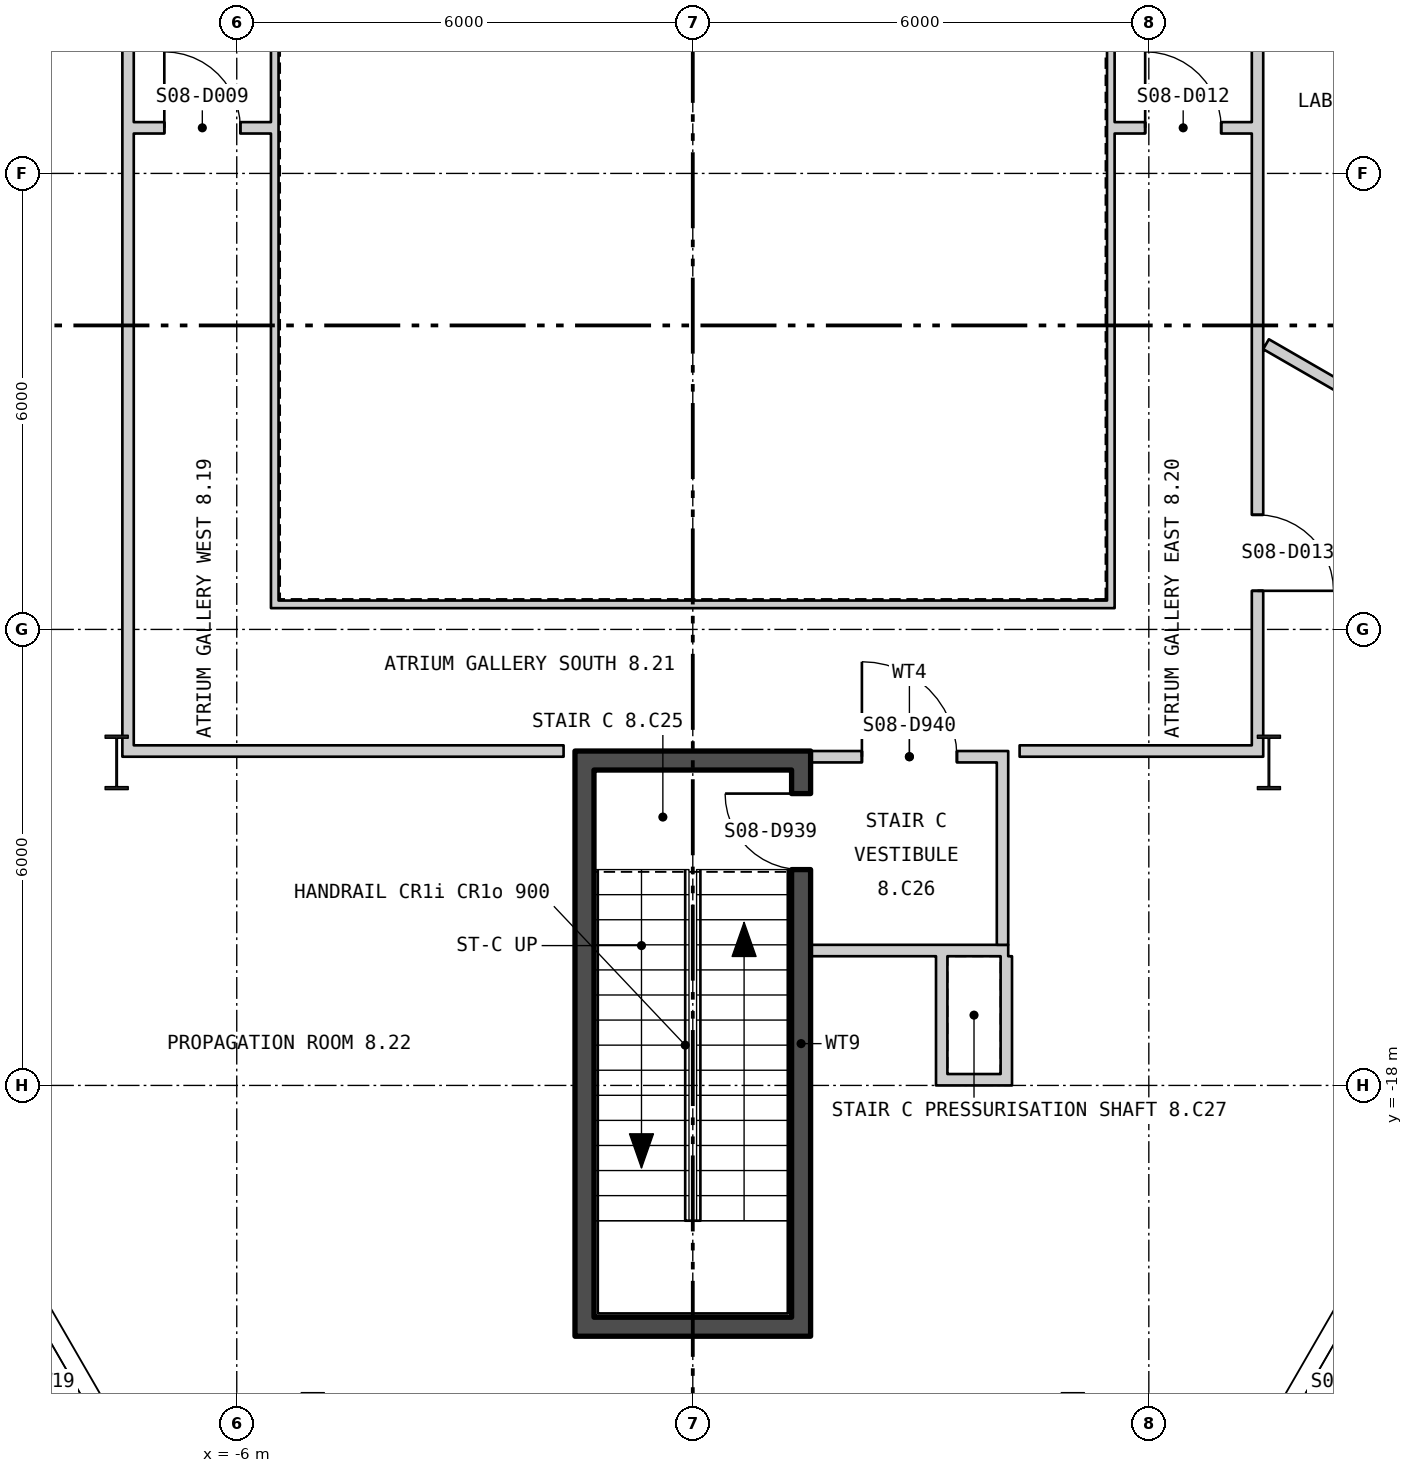
"""IFC4 building model, lengths in metres.
Left out: names, types, materials, properties, quantities, classifications, styles, units other than length and angle.
Written with IfcOpenShell. Run it as: python <this file> out.ifc"""

import sys

from ifc_helpers import new_model, si_unit, direction, frame, frame_2d, origin, origin_2d, place, context, subcontext, project, spatial, polyline, rectangle, i_section, outline, extrude, element, fill, save


model = new_model("IFC4")
c1 = context("Model", 3, precision=1e-05, world=origin(), true_north=direction((0.0, 1.0)))
c2 = subcontext(c1, "Body", "Model", "MODEL_VIEW")
j1 = project(units=[si_unit("LENGTHUNIT", "METRE"), si_unit("PLANEANGLEUNIT", "RADIAN")], contexts=[c1])
p1 = place(None, origin())
s1 = spatial("IfcSite", under=j1, at=p1, CompositionType="ELEMENT")
p2 = place(p1, origin())
s2 = spatial("IfcBuilding", under=s1, at=p2, CompositionType="ELEMENT")
p3 = place(p2, frame((0.0, 0.0, 111.3)))
s3 = spatial("IfcBuildingStorey", under=s2, at=p3, CompositionType="ELEMENT", Elevation=111.3)
for number, where, z_axis, x_axis in (
    (1, (7.58, -13.75, 0.0), (0.0, 0.0, 1.0), (1.0, 0.0, 0.0)),
    (2, (-7.58, -13.75, 0.0), (0.0, 0.0, 1.0), (1.0, 0.0, 0.0)),
    (3, (5.0, -22.4, 0.0), (0.0, 0.0, 1.0), (1.0, 0.0, 0.0)),
    (4, (-5.0, -22.4, 0.0), (0.0, 0.0, 1.0), (1.0, 0.0, 0.0)),
):
    element("IfcColumn", number, at=place(p3, frame(where, z_axis=z_axis, x_axis=x_axis)), inside=s3, PredefinedType="COLUMN", context=c2, shape_type="SweptSolid", body=[
        extrude(i_section(OverallWidth=0.304, OverallDepth=0.716, WebThickness=0.021, FlangeThickness=0.04, at=origin_2d()), origin(), (0.0, 0.0, 1.0), 4.5),
    ])
p4 = place(p3, frame((-27.595, 11.782, -0.18), z_axis=(0.0, 0.0, 1.0), x_axis=(0.500000141277, -0.866025322218, 0.0)))
e5 = element("IfcWall", 5, at=p4, inside=s3, PredefinedType="SOLIDWALL", context=c2, shape_type="SweptSolid", body=[
    extrude(outline(polyline([(-0.13, -0.225), (45.86, -0.225), (45.6, 0.225), (0.13, 0.225), (-0.13, -0.225)])), origin(), (0.0, 0.0, 1.0), 4.28),
])
p5 = place(p4, frame((1.424, 0.0, 1.08)))
e6 = element("IfcOpeningElement", 6, at=p5, cuts=e5, PredefinedType="OPENING", context=c2, shape_type="SweptSolid", body=[
    extrude(rectangle(XDim=2.4, YDim=2.6, at=frame_2d((1.2, 1.3))), frame((0.0, 0.235, 0.0), z_axis=(0.0, -1.0, 0.0), x_axis=(1.0, 0.0, 0.0)), (0.0, 0.0, 1.0), 0.47),
])
p6 = place(p4, frame((5.892, 0.0, 1.08)))
e7 = element("IfcOpeningElement", 7, at=p6, cuts=e5, PredefinedType="OPENING", context=c2, shape_type="SweptSolid", body=[
    extrude(rectangle(XDim=2.4, YDim=2.6, at=frame_2d((1.2, 1.3))), frame((0.0, 0.235, 0.0), z_axis=(0.0, -1.0, 0.0), x_axis=(1.0, 0.0, 0.0)), (0.0, 0.0, 1.0), 0.47),
])
p7 = place(p4, frame((10.399, 0.0, 1.08)))
e8 = element("IfcOpeningElement", 8, at=p7, cuts=e5, PredefinedType="OPENING", context=c2, shape_type="SweptSolid", body=[
    extrude(rectangle(XDim=2.4, YDim=2.6, at=frame_2d((1.2, 1.3))), frame((0.0, 0.235, 0.0), z_axis=(0.0, -1.0, 0.0), x_axis=(1.0, 0.0, 0.0)), (0.0, 0.0, 1.0), 0.47),
])
p8 = place(p4, frame((14.905, 0.0, 1.08)))
e9 = element("IfcOpeningElement", 9, at=p8, cuts=e5, PredefinedType="OPENING", context=c2, shape_type="SweptSolid", body=[
    extrude(rectangle(XDim=2.4, YDim=2.6, at=frame_2d((1.2, 1.3))), frame((0.0, 0.235, 0.0), z_axis=(0.0, -1.0, 0.0), x_axis=(1.0, 0.0, 0.0)), (0.0, 0.0, 1.0), 0.47),
])
p9 = place(p4, frame((19.412, 0.0, 1.08)))
e10 = element("IfcOpeningElement", 10, at=p9, cuts=e5, PredefinedType="OPENING", context=c2, shape_type="SweptSolid", body=[
    extrude(rectangle(XDim=2.4, YDim=2.6, at=frame_2d((1.2, 1.3))), frame((0.0, 0.235, 0.0), z_axis=(0.0, -1.0, 0.0), x_axis=(1.0, 0.0, 0.0)), (0.0, 0.0, 1.0), 0.47),
])
p10 = place(p4, frame((23.918, 0.0, 1.08)))
e11 = element("IfcOpeningElement", 11, at=p10, cuts=e5, PredefinedType="OPENING", context=c2, shape_type="SweptSolid", body=[
    extrude(rectangle(XDim=2.4, YDim=2.6, at=frame_2d((1.2, 1.3))), frame((0.0, 0.235, 0.0), z_axis=(0.0, -1.0, 0.0), x_axis=(1.0, 0.0, 0.0)), (0.0, 0.0, 1.0), 0.47),
])
p11 = place(p4, frame((28.425, 0.0, 1.08)))
e12 = element("IfcOpeningElement", 12, at=p11, cuts=e5, PredefinedType="OPENING", context=c2, shape_type="SweptSolid", body=[
    extrude(rectangle(XDim=2.4, YDim=2.6, at=frame_2d((1.2, 1.3))), frame((0.0, 0.235, 0.0), z_axis=(0.0, -1.0, 0.0), x_axis=(1.0, 0.0, 0.0)), (0.0, 0.0, 1.0), 0.47),
])
p12 = place(p4, frame((32.932, 0.0, 1.08)))
e13 = element("IfcOpeningElement", 13, at=p12, cuts=e5, PredefinedType="OPENING", context=c2, shape_type="SweptSolid", body=[
    extrude(rectangle(XDim=2.4, YDim=2.6, at=frame_2d((1.2, 1.3))), frame((0.0, 0.235, 0.0), z_axis=(0.0, -1.0, 0.0), x_axis=(1.0, 0.0, 0.0)), (0.0, 0.0, 1.0), 0.47),
])
p13 = place(p4, frame((37.438, 0.0, 1.08)))
e14 = element("IfcOpeningElement", 14, at=p13, cuts=e5, PredefinedType="OPENING", context=c2, shape_type="SweptSolid", body=[
    extrude(rectangle(XDim=2.4, YDim=2.6, at=frame_2d((1.2, 1.3))), frame((0.0, 0.235, 0.0), z_axis=(0.0, -1.0, 0.0), x_axis=(1.0, 0.0, 0.0)), (0.0, 0.0, 1.0), 0.47),
])
p14 = place(p4, frame((41.907, 0.0, 1.08)))
e15 = element("IfcOpeningElement", 15, at=p14, cuts=e5, PredefinedType="OPENING", context=c2, shape_type="SweptSolid", body=[
    extrude(rectangle(XDim=2.4, YDim=2.6, at=frame_2d((1.2, 1.3))), frame((0.0, 0.235, 0.0), z_axis=(0.0, -1.0, 0.0), x_axis=(1.0, 0.0, 0.0)), (0.0, 0.0, 1.0), 0.47),
])
p15 = place(p3, frame((4.73, -27.821, -0.18), z_axis=(0.0, 0.0, 1.0), x_axis=(0.500000141277, 0.866025322218, 0.0)))
e16 = element("IfcWall", 16, at=p15, inside=s3, PredefinedType="SOLIDWALL", context=c2, shape_type="SweptSolid", body=[
    extrude(outline(polyline([(-0.13, -0.225), (45.86, -0.225), (45.6, 0.225), (0.13, 0.225), (-0.13, -0.225)])), origin(), (0.0, 0.0, 1.0), 4.28),
])
p16 = place(p15, frame((1.424, 0.0, 1.08)))
e17 = element("IfcOpeningElement", 17, at=p16, cuts=e16, PredefinedType="OPENING", context=c2, shape_type="SweptSolid", body=[
    extrude(rectangle(XDim=2.4, YDim=2.6, at=frame_2d((1.2, 1.3))), frame((0.0, 0.235, 0.0), z_axis=(0.0, -1.0, 0.0), x_axis=(1.0, 0.0, 0.0)), (0.0, 0.0, 1.0), 0.47),
])
p17 = place(p15, frame((5.892, 0.0, 1.08)))
e18 = element("IfcOpeningElement", 18, at=p17, cuts=e16, PredefinedType="OPENING", context=c2, shape_type="SweptSolid", body=[
    extrude(rectangle(XDim=2.4, YDim=2.6, at=frame_2d((1.2, 1.3))), frame((0.0, 0.235, 0.0), z_axis=(0.0, -1.0, 0.0), x_axis=(1.0, 0.0, 0.0)), (0.0, 0.0, 1.0), 0.47),
])
p18 = place(p15, frame((10.399, 0.0, 1.08)))
e19 = element("IfcOpeningElement", 19, at=p18, cuts=e16, PredefinedType="OPENING", context=c2, shape_type="SweptSolid", body=[
    extrude(rectangle(XDim=2.4, YDim=2.6, at=frame_2d((1.2, 1.3))), frame((0.0, 0.235, 0.0), z_axis=(0.0, -1.0, 0.0), x_axis=(1.0, 0.0, 0.0)), (0.0, 0.0, 1.0), 0.47),
])
p19 = place(p15, frame((14.905, 0.0, 1.08)))
e20 = element("IfcOpeningElement", 20, at=p19, cuts=e16, PredefinedType="OPENING", context=c2, shape_type="SweptSolid", body=[
    extrude(rectangle(XDim=2.4, YDim=2.6, at=frame_2d((1.2, 1.3))), frame((0.0, 0.235, 0.0), z_axis=(0.0, -1.0, 0.0), x_axis=(1.0, 0.0, 0.0)), (0.0, 0.0, 1.0), 0.47),
])
p20 = place(p15, frame((19.412, 0.0, 1.08)))
e21 = element("IfcOpeningElement", 21, at=p20, cuts=e16, PredefinedType="OPENING", context=c2, shape_type="SweptSolid", body=[
    extrude(rectangle(XDim=2.4, YDim=2.6, at=frame_2d((1.2, 1.3))), frame((0.0, 0.235, 0.0), z_axis=(0.0, -1.0, 0.0), x_axis=(1.0, 0.0, 0.0)), (0.0, 0.0, 1.0), 0.47),
])
p21 = place(p15, frame((23.918, 0.0, 1.08)))
e22 = element("IfcOpeningElement", 22, at=p21, cuts=e16, PredefinedType="OPENING", context=c2, shape_type="SweptSolid", body=[
    extrude(rectangle(XDim=2.4, YDim=2.6, at=frame_2d((1.2, 1.3))), frame((0.0, 0.235, 0.0), z_axis=(0.0, -1.0, 0.0), x_axis=(1.0, 0.0, 0.0)), (0.0, 0.0, 1.0), 0.47),
])
p22 = place(p15, frame((28.425, 0.0, 1.08)))
e23 = element("IfcOpeningElement", 23, at=p22, cuts=e16, PredefinedType="OPENING", context=c2, shape_type="SweptSolid", body=[
    extrude(rectangle(XDim=2.4, YDim=2.6, at=frame_2d((1.2, 1.3))), frame((0.0, 0.235, 0.0), z_axis=(0.0, -1.0, 0.0), x_axis=(1.0, 0.0, 0.0)), (0.0, 0.0, 1.0), 0.47),
])
p23 = place(p15, frame((32.932, 0.0, 1.08)))
e24 = element("IfcOpeningElement", 24, at=p23, cuts=e16, PredefinedType="OPENING", context=c2, shape_type="SweptSolid", body=[
    extrude(rectangle(XDim=2.4, YDim=2.6, at=frame_2d((1.2, 1.3))), frame((0.0, 0.235, 0.0), z_axis=(0.0, -1.0, 0.0), x_axis=(1.0, 0.0, 0.0)), (0.0, 0.0, 1.0), 0.47),
])
p24 = place(p15, frame((37.438, 0.0, 1.08)))
e25 = element("IfcOpeningElement", 25, at=p24, cuts=e16, PredefinedType="OPENING", context=c2, shape_type="SweptSolid", body=[
    extrude(rectangle(XDim=2.4, YDim=2.6, at=frame_2d((1.2, 1.3))), frame((0.0, 0.235, 0.0), z_axis=(0.0, -1.0, 0.0), x_axis=(1.0, 0.0, 0.0)), (0.0, 0.0, 1.0), 0.47),
])
p25 = place(p15, frame((41.907, 0.0, 1.08)))
e26 = element("IfcOpeningElement", 26, at=p25, cuts=e16, PredefinedType="OPENING", context=c2, shape_type="SweptSolid", body=[
    extrude(rectangle(XDim=2.4, YDim=2.6, at=frame_2d((1.2, 1.3))), frame((0.0, 0.235, 0.0), z_axis=(0.0, -1.0, 0.0), x_axis=(1.0, 0.0, 0.0)), (0.0, 0.0, 1.0), 0.47),
])
p26 = place(p3, frame((-5.55, -11.67, 0.0), z_axis=(0.0, 0.0, 1.0), x_axis=(1.0, 0.0, 0.0)))
e27 = element("IfcWall", 27, at=p26, inside=s3, PredefinedType="PARTITIONING", context=c2, shape_type="SweptSolid", body=[
    extrude(rectangle(XDim=11.1, YDim=0.1, at=frame_2d((5.55, 0.0))), origin(), (0.0, 0.0, 1.0), 4.3),
])
for number, where, z_axis, x_axis in (
    (28, (5.5, -11.62, 0.0), (0.0, 0.0, 1.0), (0.0, 1.0, 0.0)),
    (29, (-5.5, -3.58, 0.0), (0.0, 0.0, 1.0), (0.0, -1.0, 0.0)),
):
    element("IfcWall", number, at=place(p3, frame(where, z_axis=z_axis, x_axis=x_axis)), inside=s3, PredefinedType="PARTITIONING", context=c2, shape_type="SweptSolid", body=[
        extrude(rectangle(XDim=8.04, YDim=0.1, at=frame_2d((4.02, 0.0))), origin(), (0.0, 0.0, 1.0), 4.3),
    ])
p27 = place(p3, frame((-1.425, -21.05, 0.0), z_axis=(0.0, 0.0, 1.0), x_axis=(0.0, 1.0, 0.0)))
e30 = element("IfcWall", 30, at=p27, inside=s3, PredefinedType="SHEAR", context=c2, shape_type="SweptSolid", body=[
    extrude(rectangle(XDim=7.2, YDim=0.25, at=frame_2d((3.6, 0.0))), origin(), (0.0, 0.0, 1.0), 4.3),
])
p28 = place(p3, frame((1.425, -21.05, 0.0), z_axis=(0.0, 0.0, 1.0), x_axis=(0.0, 1.0, 0.0)))
e31 = element("IfcWall", 31, at=p28, inside=s3, PredefinedType="SHEAR", context=c2, shape_type="SweptSolid", body=[
    extrude(rectangle(XDim=7.2, YDim=0.25, at=frame_2d((3.6, 0.0))), origin(), (0.0, 0.0, 1.0), 4.3),
])
p29 = place(p28, frame((5.89, 0.0, 0.0)))
e32 = element("IfcOpeningElement", 32, at=p29, cuts=e31, PredefinedType="OPENING", context=c2, shape_type="SweptSolid", body=[
    extrude(rectangle(XDim=1.0, YDim=2.1, at=frame_2d((0.5, 1.05))), frame((0.0, 0.135, 0.0), z_axis=(0.0, -1.0, 0.0), x_axis=(1.0, 0.0, 0.0)), (0.0, 0.0, 1.0), 0.27),
])
for number, where, z_axis, x_axis in (
    (33, (-1.55, -21.175, 0.0), (0.0, 0.0, 1.0), (1.0, 0.0, 0.0)),
    (34, (-1.55, -13.725, 0.0), (0.0, 0.0, 1.0), (1.0, 0.0, 0.0)),
):
    element("IfcWall", number, at=place(p3, frame(where, z_axis=z_axis, x_axis=x_axis)), inside=s3, PredefinedType="SHEAR", context=c2, shape_type="SweptSolid", body=[
        extrude(rectangle(XDim=3.1, YDim=0.25, at=frame_2d((1.55, 0.0))), origin(), (0.0, 0.0, 1.0), 4.3),
    ])
p30 = place(p3, frame((1.55, -16.225, 0.0), z_axis=(0.0, 0.0, 1.0), x_axis=(1.0, 0.0, 0.0)))
e35 = element("IfcWall", 35, at=p30, inside=s3, PredefinedType="PARTITIONING", context=c2, shape_type="SweptSolid", body=[
    extrude(rectangle(XDim=2.6, YDim=0.15, at=frame_2d((1.3, 0.0))), origin(), (0.0, 0.0, 1.0), 4.3),
])
p31 = place(p3, frame((4.075, -16.15, 0.0), z_axis=(0.0, 0.0, 1.0), x_axis=(0.0, 1.0, 0.0)))
e36 = element("IfcWall", 36, at=p31, inside=s3, PredefinedType="PARTITIONING", context=c2, shape_type="SweptSolid", body=[
    extrude(rectangle(XDim=2.4, YDim=0.15, at=frame_2d((1.2, 0.0))), origin(), (0.0, 0.0, 1.0), 4.3),
])
p32 = place(p3, frame((1.55, -13.675, 0.0), z_axis=(0.0, 0.0, 1.0), x_axis=(1.0, 0.0, 0.0)))
e37 = element("IfcWall", 37, at=p32, inside=s3, PredefinedType="PARTITIONING", context=c2, shape_type="SweptSolid", body=[
    extrude(rectangle(XDim=2.6, YDim=0.15, at=frame_2d((1.3, 0.0))), origin(), (0.0, 0.0, 1.0), 3.39),
])
p33 = place(p32, frame((0.675, 0.0, 0.0)))
e38 = element("IfcOpeningElement", 38, at=p33, cuts=e37, PredefinedType="OPENING", context=c2, shape_type="SweptSolid", body=[
    extrude(rectangle(XDim=1.25, YDim=2.1, at=frame_2d((0.625, 1.05))), frame((0.0, 0.085, 0.0), z_axis=(0.0, -1.0, 0.0), x_axis=(1.0, 0.0, 0.0)), (0.0, 0.0, 1.0), 0.17),
])
p34 = place(p3, frame((3.275, -18.0, 0.0), z_axis=(0.0, 0.0, 1.0), x_axis=(0.0, 1.0, 0.0)))
e39 = element("IfcWall", 39, at=p34, inside=s3, PredefinedType="PARTITIONING", context=c2, shape_type="SweptSolid", body=[
    extrude(rectangle(XDim=1.7, YDim=0.15, at=frame_2d((0.85, 0.0))), origin(), (0.0, 0.0, 1.0), 3.7),
])
p35 = place(p3, frame((3.35, -17.925, 0.0), z_axis=(0.0, 0.0, 1.0), x_axis=(1.0, 0.0, 0.0)))
e40 = element("IfcWall", 40, at=p35, inside=s3, PredefinedType="PARTITIONING", context=c2, shape_type="SweptSolid", body=[
    extrude(rectangle(XDim=0.7, YDim=0.15, at=frame_2d((0.35, 0.0))), origin(), (0.0, 0.0, 1.0), 4.3),
])
p36 = place(p3, frame((4.125, -18.0, 0.0), z_axis=(0.0, 0.0, 1.0), x_axis=(0.0, 1.0, 0.0)))
e41 = element("IfcWall", 41, at=p36, inside=s3, PredefinedType="PARTITIONING", context=c2, shape_type="SweptSolid", body=[
    extrude(rectangle(XDim=1.7, YDim=0.15, at=frame_2d((0.85, 0.0))), origin(), (0.0, 0.0, 1.0), 4.3),
])
p37 = place(p3, frame((-7.43, -13.675, 0.0), z_axis=(0.0, 0.0, 1.0), x_axis=(0.0, 1.0, 0.0)))
e42 = element("IfcWall", 42, at=p37, inside=s3, PredefinedType="PARTITIONING", context=c2, shape_type="SweptSolid", body=[
    extrude(rectangle(XDim=10.167, YDim=0.15, at=frame_2d((5.083, 0.0))), origin(), (0.0, 0.0, 1.0), 3.7),
])
p38 = place(p3, frame((-7.355, -13.6, 0.0), z_axis=(0.0, 0.0, 1.0), x_axis=(1.0, 0.0, 0.0)))
e43 = element("IfcWall", 43, at=p38, inside=s3, PredefinedType="PARTITIONING", context=c2, shape_type="SweptSolid", body=[
    extrude(rectangle(XDim=5.655, YDim=0.15, at=frame_2d((2.828, 0.0))), origin(), (0.0, 0.0, 1.0), 3.39),
])
p39 = place(p3, frame((-7.355, -5.4, 0.0), z_axis=(0.0, 0.0, 1.0), x_axis=(1.0, 0.0, 0.0)))
e44 = element("IfcWall", 44, at=p39, inside=s3, PredefinedType="PARTITIONING", context=c2, shape_type="SweptSolid", body=[
    extrude(rectangle(XDim=1.805, YDim=0.15, at=frame_2d((0.902, 0.0))), origin(), (0.0, 0.0, 1.0), 4.3),
])
p40 = place(p39, frame((0.402, 0.0, 0.0)))
e45 = element("IfcOpeningElement", 45, at=p40, cuts=e44, PredefinedType="OPENING", context=c2, shape_type="SweptSolid", body=[
    extrude(rectangle(XDim=1.0, YDim=2.1, at=frame_2d((0.5, 1.05))), frame((0.0, 0.085, 0.0), z_axis=(0.0, -1.0, 0.0), x_axis=(1.0, 0.0, 0.0)), (0.0, 0.0, 1.0), 0.17),
])
p41 = place(p3, frame((4.3, -13.6, 0.0), z_axis=(0.0, 0.0, 1.0), x_axis=(1.0, 0.0, 0.0)))
e46 = element("IfcWall", 46, at=p41, inside=s3, PredefinedType="PARTITIONING", context=c2, shape_type="SweptSolid", body=[
    extrude(rectangle(XDim=3.055, YDim=0.15, at=frame_2d((1.528, 0.0))), origin(), (0.0, 0.0, 1.0), 3.39),
])
p42 = place(p3, frame((5.55, -5.4, 0.0), z_axis=(0.0, 0.0, 1.0), x_axis=(1.0, 0.0, 0.0)))
e47 = element("IfcWall", 47, at=p42, inside=s3, PredefinedType="PARTITIONING", context=c2, shape_type="SweptSolid", body=[
    extrude(rectangle(XDim=1.805, YDim=0.15, at=frame_2d((0.902, 0.0))), origin(), (0.0, 0.0, 1.0), 4.3),
])
p43 = place(p42, frame((0.402, 0.0, 0.0)))
e48 = element("IfcOpeningElement", 48, at=p43, cuts=e47, PredefinedType="OPENING", context=c2, shape_type="SweptSolid", body=[
    extrude(rectangle(XDim=1.0, YDim=2.1, at=frame_2d((0.5, 1.05))), frame((0.0, 0.085, 0.0), z_axis=(0.0, -1.0, 0.0), x_axis=(1.0, 0.0, 0.0)), (0.0, 0.0, 1.0), 0.17),
])
p44 = place(p3, frame((7.43, -13.675, 0.0), z_axis=(0.0, 0.0, 1.0), x_axis=(0.0, 1.0, 0.0)))
e49 = element("IfcWall", 49, at=p44, inside=s3, PredefinedType="PARTITIONING", context=c2, shape_type="SweptSolid", body=[
    extrude(rectangle(XDim=10.167, YDim=0.15, at=frame_2d((5.083, 0.0))), origin(), (0.0, 0.0, 1.0), 3.7),
])
p45 = place(p44, frame((2.183, 0.0, 0.0)))
e50 = element("IfcOpeningElement", 50, at=p45, cuts=e49, PredefinedType="OPENING", context=c2, shape_type="SweptSolid", body=[
    extrude(rectangle(XDim=1.0, YDim=2.1, at=frame_2d((0.5, 1.05))), frame((0.0, 0.085, 0.0), z_axis=(0.0, -1.0, 0.0), x_axis=(1.0, 0.0, 0.0)), (0.0, 0.0, 1.0), 0.17),
])
p46 = place(p3, frame((7.542, -8.247, 0.0), z_axis=(0.0, 0.0, 1.0), x_axis=(0.866078355221, -0.499908274205, 0.0)))
e51 = element("IfcWall", 51, at=p46, inside=s3, PredefinedType="PARTITIONING", context=c2, shape_type="SweptSolid", body=[
    extrude(rectangle(XDim=6.677, YDim=0.15, at=frame_2d((3.339, 0.0))), origin(), (0.0, 0.0, 1.0), 4.3),
])
p47 = place(p13, origin())
e52 = element("IfcWindow", 52, at=p47, inside=s3, PartitioningType="SINGLE_PANEL", PredefinedType="WINDOW", context=c2, shape_type="SweptSolid", body=[
    extrude(rectangle(XDim=2.4, YDim=2.6, at=frame_2d((1.2, 1.3))), frame((0.0, 0.105, 0.0), z_axis=(0.0, -1.0, 0.0), x_axis=(1.0, 0.0, 0.0)), (0.0, 0.0, 1.0), 0.06),
])
fill(e14, e52)
p48 = place(p17, origin())
e53 = element("IfcWindow", 53, at=p48, inside=s3, PartitioningType="SINGLE_PANEL", PredefinedType="WINDOW", context=c2, shape_type="SweptSolid", body=[
    extrude(rectangle(XDim=2.4, YDim=2.6, at=frame_2d((1.2, 1.3))), frame((0.0, 0.105, 0.0), z_axis=(0.0, -1.0, 0.0), x_axis=(1.0, 0.0, 0.0)), (0.0, 0.0, 1.0), 0.06),
])
fill(e18, e53)
p49 = place(p29, origin())
e54 = element("IfcDoor", 54, at=p49, inside=s3, OperationType="SINGLE_SWING_LEFT", PredefinedType="DOOR", context=c2, shape_type="SweptSolid", body=[
    extrude(rectangle(XDim=1.0, YDim=2.1, at=frame_2d((0.5, 1.05))), frame((0.0, 0.025, 0.0), z_axis=(0.0, -1.0, 0.0), x_axis=(1.0, 0.0, 0.0)), (0.0, 0.0, 1.0), 0.05),
])
fill(e32, e54)
p50 = place(p33, origin())
e55 = element("IfcDoor", 55, at=p50, inside=s3, OperationType="SINGLE_SWING_RIGHT", PredefinedType="DOOR", context=c2, shape_type="SweptSolid", body=[
    extrude(rectangle(XDim=1.25, YDim=2.1, at=frame_2d((0.625, 1.05))), frame((0.0, 0.025, 0.0), z_axis=(0.0, -1.0, 0.0), x_axis=(1.0, 0.0, 0.0)), (0.0, 0.0, 1.0), 0.05),
])
fill(e38, e55)
p51 = place(p40, origin())
e56 = element("IfcDoor", 56, at=p51, inside=s3, OperationType="SINGLE_SWING_RIGHT", PredefinedType="DOOR", context=c2, shape_type="SweptSolid", body=[
    extrude(rectangle(XDim=1.0, YDim=2.1, at=frame_2d((0.5, 1.05))), frame((0.0, 0.025, 0.0), z_axis=(0.0, -1.0, 0.0), x_axis=(1.0, 0.0, 0.0)), (0.0, 0.0, 1.0), 0.05),
])
fill(e45, e56)
p52 = place(p43, origin())
e57 = element("IfcDoor", 57, at=p52, inside=s3, OperationType="SINGLE_SWING_RIGHT", PredefinedType="DOOR", context=c2, shape_type="SweptSolid", body=[
    extrude(rectangle(XDim=1.0, YDim=2.1, at=frame_2d((0.5, 1.05))), frame((0.0, 0.025, 0.0), z_axis=(0.0, -1.0, 0.0), x_axis=(1.0, 0.0, 0.0)), (0.0, 0.0, 1.0), 0.05),
])
fill(e48, e57)
p53 = place(p45, origin())
e58 = element("IfcDoor", 58, at=p53, inside=s3, OperationType="SINGLE_SWING_LEFT", PredefinedType="DOOR", context=c2, shape_type="SweptSolid", body=[
    extrude(rectangle(XDim=1.0, YDim=2.1, at=frame_2d((0.5, 1.05))), frame((0.0, 0.025, 0.0), z_axis=(0.0, -1.0, 0.0), x_axis=(1.0, 0.0, 0.0)), (0.0, 0.0, 1.0), 0.05),
])
fill(e50, e58)
save(model, sys.argv[1])
